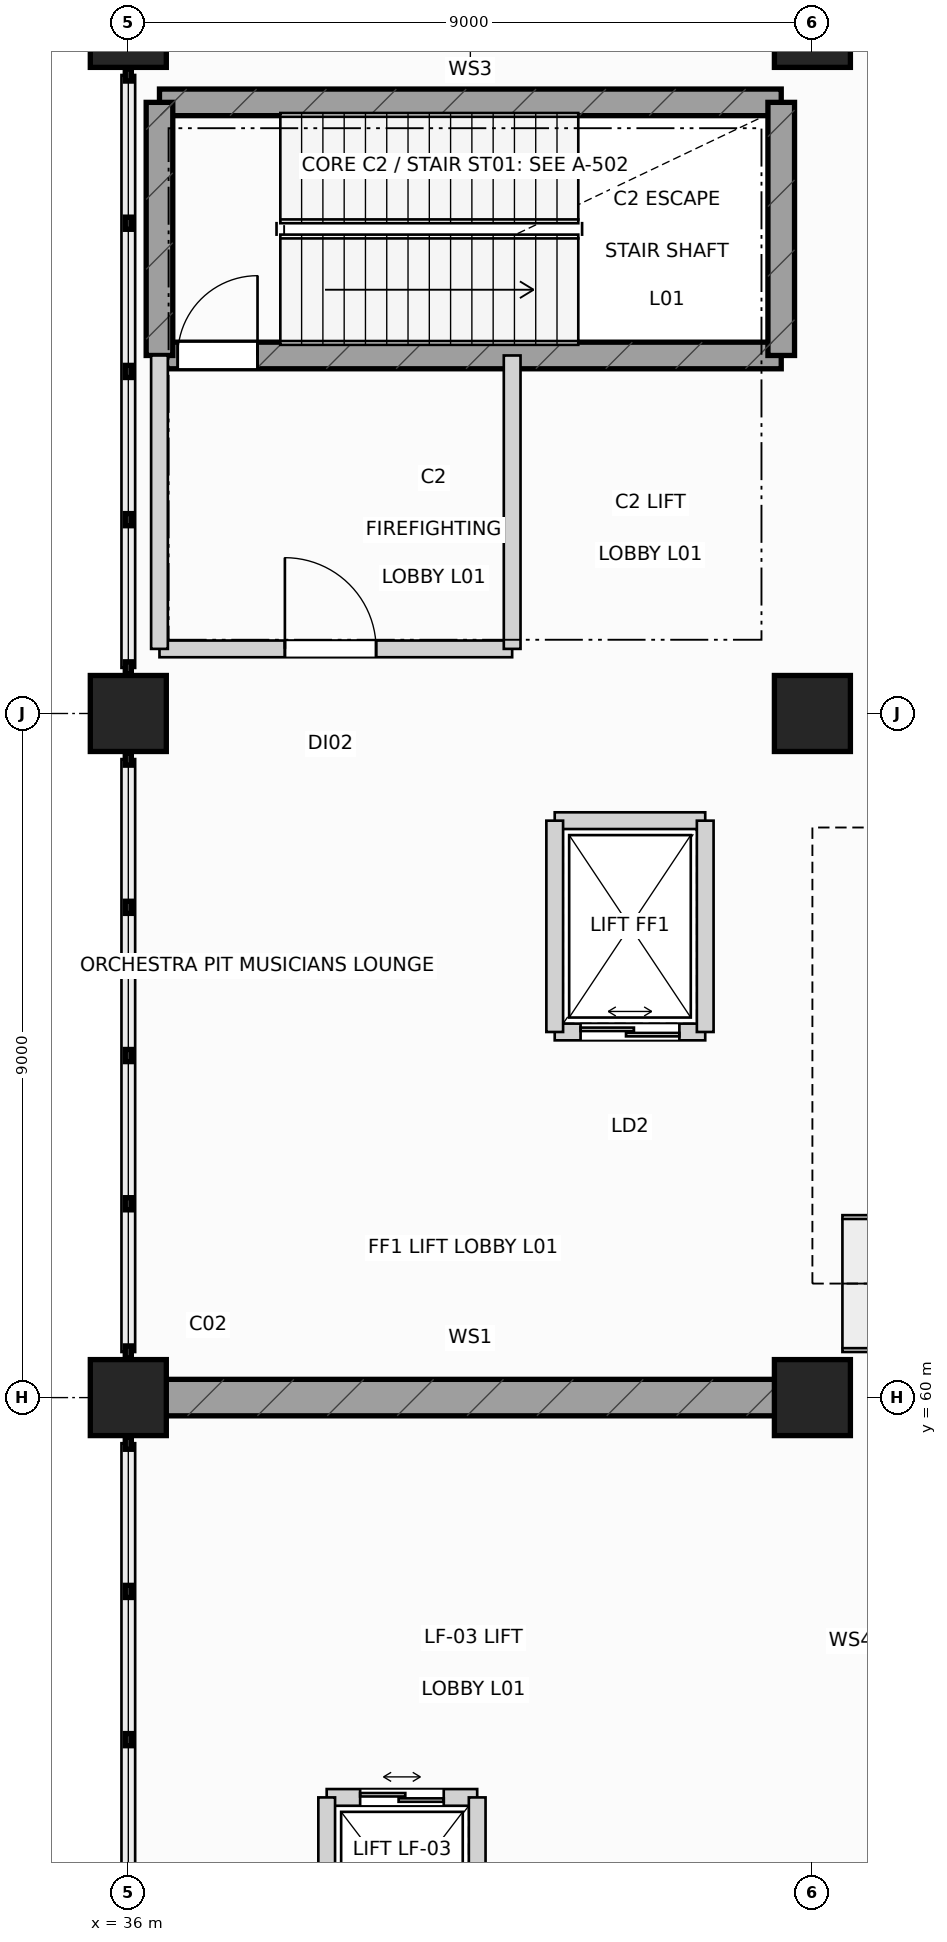
"""IFC4 building model, lengths in metres.
Left out: names, types, materials, properties, quantities, classifications, styles, units other than length and angle.
Written with IfcOpenShell. Run it as: python <this file> out.ifc"""

import sys

from ifc_helpers import new_model, si_unit, direction, frame, frame_2d, origin, origin_2d, place, context, subcontext, project, spatial, rectangle, extrude, element, fill, save


model = new_model("IFC4")
c1 = context("Model", 3, precision=1e-05, world=origin(), true_north=direction((0.0, 1.0)))
c2 = subcontext(c1, "Body", "Model", "MODEL_VIEW")
j1 = project(units=[si_unit("LENGTHUNIT", "METRE"), si_unit("PLANEANGLEUNIT", "RADIAN")], contexts=[c1])
p1 = place(None, origin())
s1 = spatial("IfcSite", under=j1, at=p1, CompositionType="ELEMENT")
p2 = place(p1, origin())
s2 = spatial("IfcBuilding", under=s1, at=p2, CompositionType="ELEMENT")
p3 = place(p2, frame((0.0, 0.0, 6.0)))
s3 = spatial("IfcBuildingStorey", under=s2, at=p3, CompositionType="ELEMENT", Elevation=6.0)
for number, where, z_axis, x_axis in (
    (1, (36.0, 60.0, 0.0), (0.0, 0.0, 1.0), (1.0, 0.0, 0.0)),
    (2, (36.0, 69.0, 0.0), (0.0, 0.0, 1.0), (1.0, 0.0, 0.0)),
    (3, (36.0, 78.0, 0.0), (0.0, 0.0, 1.0), (1.0, 0.0, 0.0)),
    (4, (45.0, 60.0, 0.0), (0.0, 0.0, 1.0), (1.0, 0.0, 0.0)),
    (5, (45.0, 69.0, 0.0), (0.0, 0.0, 1.0), (1.0, 0.0, 0.0)),
    (6, (45.0, 78.0, 0.0), (0.0, 0.0, 1.0), (1.0, 0.0, 0.0)),
):
    element("IfcColumn", number, at=place(p3, frame(where, z_axis=z_axis, x_axis=x_axis)), inside=s3, PredefinedType="COLUMN", context=c2, shape_type="SweptSolid", body=[
        extrude(rectangle(XDim=1.0, YDim=1.0, at=origin_2d()), origin(), (0.0, 0.0, 1.0), 5.4),
    ])
p4 = place(p3, frame((36.0, 60.0, 0.0), z_axis=(0.0, 0.0, 1.0), x_axis=(1.0, 0.0, 0.0)))
e7 = element("IfcWall", 7, at=p4, inside=s3, PredefinedType="SHEAR", context=c2, shape_type="SweptSolid", body=[
    extrude(rectangle(XDim=9.0, YDim=0.48, at=frame_2d((4.5, 0.0))), origin(), (0.0, 0.0, 1.0), 5.05),
])
p5 = place(p3, frame((36.41, 73.71, 0.0), z_axis=(0.0, 0.0, 1.0), x_axis=(1.0, 0.0, 0.0)))
e8 = element("IfcWall", 8, at=p5, inside=s3, PredefinedType="SHEAR", context=c2, shape_type="SweptSolid", body=[
    extrude(rectangle(XDim=8.18, YDim=0.35, at=frame_2d((4.09, 0.0))), origin(), (0.0, 0.0, 1.0), 5.05),
])
p6 = place(p5, frame((0.24, 0.0, 0.0)))
e9 = element("IfcOpeningElement", 9, at=p6, cuts=e8, PredefinedType="OPENING", context=c2, shape_type="SweptSolid", body=[
    extrude(rectangle(XDim=1.05, YDim=2.18, at=frame_2d((0.525, 1.09))), frame((0.0, 0.185, 0.0), z_axis=(0.0, -1.0, 0.0), x_axis=(1.0, 0.0, 0.0)), (0.0, 0.0, 1.0), 0.37),
])
p7 = place(p3, frame((36.41, 77.04, 0.0), z_axis=(0.0, 0.0, 1.0), x_axis=(1.0, 0.0, 0.0)))
e10 = element("IfcWall", 10, at=p7, inside=s3, PredefinedType="SHEAR", context=c2, shape_type="SweptSolid", body=[
    extrude(rectangle(XDim=8.18, YDim=0.35, at=frame_2d((4.09, 0.0))), origin(), (0.0, 0.0, 1.0), 5.05),
])
for number, where, z_axis, x_axis in (
    (11, (36.41, 73.71, 0.0), (0.0, 0.0, 1.0), (0.0, 1.0, 0.0)),
    (12, (44.59, 73.71, 0.0), (0.0, 0.0, 1.0), (0.0, 1.0, 0.0)),
):
    element("IfcWall", number, at=place(p3, frame(where, z_axis=z_axis, x_axis=x_axis)), inside=s3, PredefinedType="SHEAR", context=c2, shape_type="SweptSolid", body=[
        extrude(rectangle(XDim=3.33, YDim=0.35, at=frame_2d((1.665, 0.0))), origin(), (0.0, 0.0, 1.0), 5.05),
    ])
p8 = place(p3, frame((36.41, 69.85, 0.0), z_axis=(0.0, 0.0, 1.0), x_axis=(1.0, 0.0, 0.0)))
e13 = element("IfcWall", 13, at=p8, inside=s3, PredefinedType="PARTITIONING", context=c2, shape_type="SweptSolid", body=[
    extrude(rectangle(XDim=4.64, YDim=0.22, at=frame_2d((2.32, 0.0))), origin(), (0.0, 0.0, 1.0), 4.215),
])
p9 = place(p8, frame((1.65, 0.0, 0.0)))
e14 = element("IfcOpeningElement", 14, at=p9, cuts=e13, PredefinedType="OPENING", context=c2, shape_type="SweptSolid", body=[
    extrude(rectangle(XDim=1.2, YDim=2.18, at=frame_2d((0.6, 1.09))), frame((0.0, 0.12, 0.0), z_axis=(0.0, -1.0, 0.0), x_axis=(1.0, 0.0, 0.0)), (0.0, 0.0, 1.0), 0.24),
])
p10 = place(p3, frame((36.41, 69.85, 0.0), z_axis=(0.0, 0.0, 1.0), x_axis=(0.0, 1.0, 0.0)))
e15 = element("IfcWall", 15, at=p10, inside=s3, PredefinedType="PARTITIONING", context=c2, shape_type="SweptSolid", body=[
    extrude(rectangle(XDim=3.86, YDim=0.22, at=frame_2d((1.93, 0.0))), origin(), (0.0, 0.0, 1.0), 4.215),
])
p11 = place(p3, frame((41.05, 69.85, 0.0), z_axis=(0.0, 0.0, 1.0), x_axis=(0.0, 1.0, 0.0)))
e16 = element("IfcWall", 16, at=p11, inside=s3, PredefinedType="PARTITIONING", context=c2, shape_type="SweptSolid", body=[
    extrude(rectangle(XDim=3.86, YDim=0.22, at=frame_2d((1.93, 0.0))), origin(), (0.0, 0.0, 1.0), 4.715),
])
p12 = place(p3, frame((38.61, 54.74, 0.0), z_axis=(0.0, 0.0, 1.0), x_axis=(1.0, 0.0, 0.0)))
e17 = element("IfcWall", 17, at=p12, inside=s3, PredefinedType="PARTITIONING", context=c2, shape_type="SweptSolid", body=[
    extrude(rectangle(XDim=1.98, YDim=0.22, at=frame_2d((0.99, 0.0))), origin(), (0.0, 0.0, 1.0), 5.015),
])
p13 = place(p12, frame((0.44, 0.0, 0.0)))
e18 = element("IfcOpeningElement", 18, at=p13, cuts=e17, PredefinedType="OPENING", context=c2, shape_type="SweptSolid", body=[
    extrude(rectangle(XDim=1.1, YDim=2.18, at=frame_2d((0.55, 1.09))), frame((0.0, 0.12, 0.0), z_axis=(0.0, -1.0, 0.0), x_axis=(1.0, 0.0, 0.0)), (0.0, 0.0, 1.0), 0.24),
])
for number, where, z_axis, x_axis in (
    (19, (38.61, 52.26, 0.0), (0.0, 0.0, 1.0), (0.0, 1.0, 0.0)),
    (20, (40.59, 52.26, 0.0), (0.0, 0.0, 1.0), (0.0, 1.0, 0.0)),
):
    element("IfcWall", number, at=place(p3, frame(where, z_axis=z_axis, x_axis=x_axis)), inside=s3, PredefinedType="PARTITIONING", context=c2, shape_type="SweptSolid", body=[
        extrude(rectangle(XDim=2.48, YDim=0.22, at=frame_2d((1.24, 0.0))), origin(), (0.0, 0.0, 1.0), 5.015),
    ])
p14 = place(p3, frame((41.61, 64.81, 0.0), z_axis=(0.0, 0.0, 1.0), x_axis=(1.0, 0.0, 0.0)))
e21 = element("IfcWall", 21, at=p14, inside=s3, PredefinedType="PARTITIONING", context=c2, shape_type="SweptSolid", body=[
    extrude(rectangle(XDim=1.98, YDim=0.22, at=frame_2d((0.99, 0.0))), origin(), (0.0, 0.0, 1.0), 5.015),
])
p15 = place(p14, frame((0.34, 0.0, 0.0)))
e22 = element("IfcOpeningElement", 22, at=p15, cuts=e21, PredefinedType="OPENING", context=c2, shape_type="SweptSolid", body=[
    extrude(rectangle(XDim=1.3, YDim=2.2, at=frame_2d((0.65, 1.1))), frame((0.0, 0.12, 0.0), z_axis=(0.0, -1.0, 0.0), x_axis=(1.0, 0.0, 0.0)), (0.0, 0.0, 1.0), 0.24),
])
p16 = place(p3, frame((41.61, 67.59, 0.0), z_axis=(0.0, 0.0, 1.0), x_axis=(1.0, 0.0, 0.0)))
e23 = element("IfcWall", 23, at=p16, inside=s3, PredefinedType="PARTITIONING", context=c2, shape_type="SweptSolid", body=[
    extrude(rectangle(XDim=1.98, YDim=0.22, at=frame_2d((0.99, 0.0))), origin(), (0.0, 0.0, 1.0), 5.015),
])
for number, where, z_axis, x_axis in (
    (24, (41.61, 64.81, 0.0), (0.0, 0.0, 1.0), (0.0, 1.0, 0.0)),
    (25, (43.59, 64.81, 0.0), (0.0, 0.0, 1.0), (0.0, 1.0, 0.0)),
):
    element("IfcWall", number, at=place(p3, frame(where, z_axis=z_axis, x_axis=x_axis)), inside=s3, PredefinedType="PARTITIONING", context=c2, shape_type="SweptSolid", body=[
        extrude(rectangle(XDim=2.78, YDim=0.22, at=frame_2d((1.39, 0.0))), origin(), (0.0, 0.0, 1.0), 4.805),
    ])
p17 = place(p6, origin())
e26 = element("IfcDoor", 26, at=p17, inside=s3, OperationType="SINGLE_SWING_RIGHT", PredefinedType="DOOR", context=c2, shape_type="SweptSolid", body=[
    extrude(rectangle(XDim=1.05, YDim=2.18, at=frame_2d((0.525, 1.09))), frame((0.0, 0.025, 0.0), z_axis=(0.0, -1.0, 0.0), x_axis=(1.0, 0.0, 0.0)), (0.0, 0.0, 1.0), 0.05),
])
fill(e9, e26)
p18 = place(p9, origin())
e27 = element("IfcDoor", 27, at=p18, inside=s3, OperationType="SINGLE_SWING_LEFT", PredefinedType="DOOR", context=c2, shape_type="SweptSolid", body=[
    extrude(rectangle(XDim=1.2, YDim=2.18, at=frame_2d((0.6, 1.09))), frame((0.0, 0.025, 0.0), z_axis=(0.0, -1.0, 0.0), x_axis=(1.0, 0.0, 0.0)), (0.0, 0.0, 1.0), 0.05),
])
fill(e14, e27)
p19 = place(p13, origin())
e28 = element("IfcDoor", 28, at=p19, inside=s3, OperationType="DOUBLE_DOOR_SLIDING", PredefinedType="DOOR", context=c2, shape_type="SweptSolid", body=[
    extrude(rectangle(XDim=1.1, YDim=2.18, at=frame_2d((0.55, 1.09))), frame((0.0, 0.025, 0.0), z_axis=(0.0, -1.0, 0.0), x_axis=(1.0, 0.0, 0.0)), (0.0, 0.0, 1.0), 0.05),
])
fill(e18, e28)
p20 = place(p15, origin())
e29 = element("IfcDoor", 29, at=p20, inside=s3, OperationType="DOUBLE_DOOR_SLIDING", PredefinedType="DOOR", context=c2, shape_type="SweptSolid", body=[
    extrude(rectangle(XDim=1.3, YDim=2.2, at=frame_2d((0.65, 1.1))), frame((0.0, 0.025, 0.0), z_axis=(0.0, -1.0, 0.0), x_axis=(1.0, 0.0, 0.0)), (0.0, 0.0, 1.0), 0.05),
])
fill(e22, e29)
save(model, sys.argv[1])
